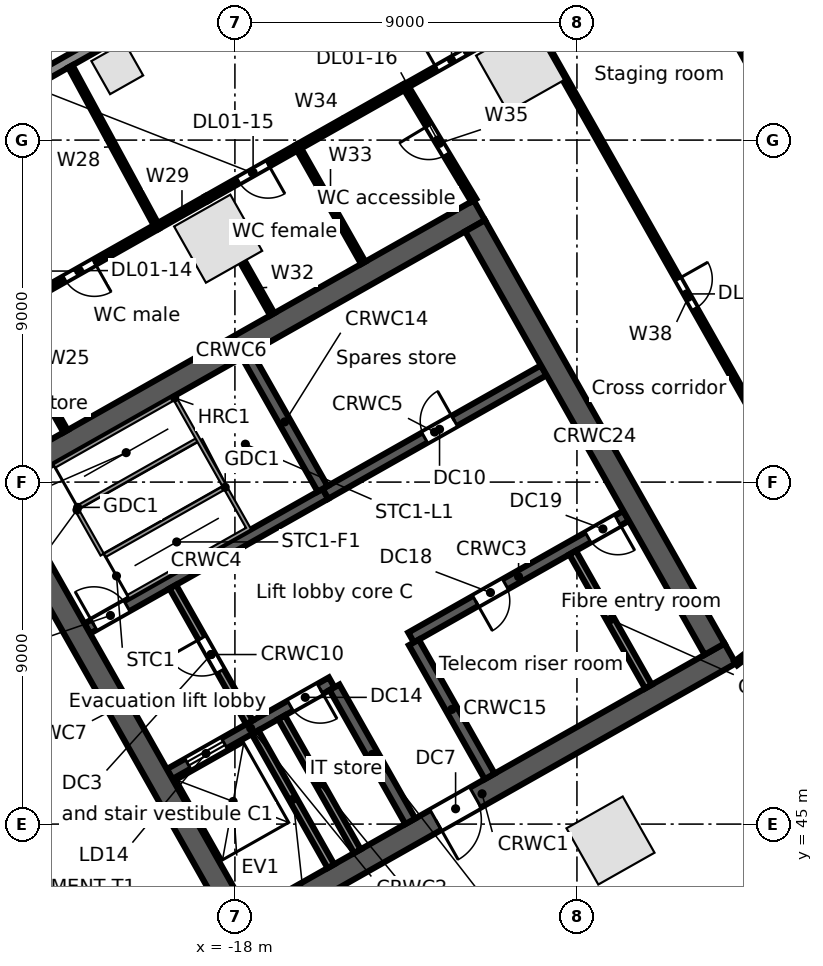
"""IFC4 building model, lengths in metres.
Left out: names, types, materials, properties, quantities, classifications, styles, units other than length and angle.
Written with IfcOpenShell. Run it as: python <this file> out.ifc"""

import sys

from ifc_helpers import new_model, si_unit, direction, frame, frame_2d, origin, origin_2d, place, context, subcontext, project, spatial, rectangle, extrude, element, fill, save


model = new_model("IFC4")
c1 = context("Model", 3, precision=1e-05, world=origin(), true_north=direction((0.0, 1.0)))
c2 = subcontext(c1, "Body", "Model", "MODEL_VIEW")
j1 = project(units=[si_unit("LENGTHUNIT", "METRE"), si_unit("PLANEANGLEUNIT", "RADIAN")], contexts=[c1])
p1 = place(None, origin())
s1 = spatial("IfcSite", under=j1, at=p1, CompositionType="ELEMENT")
p2 = place(p1, origin())
s2 = spatial("IfcBuilding", under=s1, at=p2, CompositionType="ELEMENT")
p3 = place(p2, frame((0.0, 0.0, 11.5)))
s3 = spatial("IfcBuildingStorey", under=s2, at=p3, CompositionType="ELEMENT", Elevation=11.5)
for number, where, z_axis, x_axis in (
    (1, (-10.495, 64.902, 0.0), (0.0, 0.0, 1.0), (-0.87, -0.492, 0.0)),
    (2, (-18.441, 60.406, 0.0), (0.0, 0.0, 1.0), (-0.87, -0.492, 0.0)),
    (3, (-8.117, 44.568, 0.0), (0.0, 0.0, 1.0), (0.87, 0.492, 0.0)),
):
    element("IfcColumn", number, at=place(p3, frame(where, z_axis=z_axis, x_axis=x_axis)), inside=s3, PredefinedType="COLUMN", context=c2, shape_type="SweptSolid", body=[
        extrude(rectangle(XDim=1.7, YDim=1.7, at=origin_2d()), origin(), (0.0, 0.0, 1.0), 5.0),
    ])
p4 = place(p3, frame((-21.096, 64.89, 0.0), z_axis=(0.0, 0.0, 1.0), x_axis=(-0.87035569594, -0.492423560103, 0.0)))
e4 = element("IfcColumn", 4, at=p4, inside=s3, PredefinedType="COLUMN", context=c2, shape_type="SweptSolid", body=[
    extrude(rectangle(XDim=1.0, YDim=1.0, at=origin_2d()), origin(), (0.0, 0.0, 1.0), 5.0),
])
p5 = place(p3, frame((-63.707, 41.701, 0.0), z_axis=(0.0, 0.0, 1.0), x_axis=(0.870355510268, 0.492423888277, 0.0)))
e5 = element("IfcWall", 5, at=p5, inside=s3, PredefinedType="STANDARD", context=c2, shape_type="SweptSolid", body=[
    extrude(rectangle(XDim=67.903, YDim=0.3, at=frame_2d((33.952, 0.0))), origin(), (0.0, 0.0, 1.0), 4.65),
])
p6 = place(p3, frame((-18.024, 42.104, 0.0), z_axis=(0.0, 0.0, 1.0), x_axis=(0.870360574057, 0.492414937962, 0.0)))
e6 = element("IfcWall", 6, at=p6, inside=s3, PredefinedType="SOLIDWALL", context=c2, shape_type="SweptSolid", body=[
    extrude(rectangle(XDim=15.0, YDim=0.6, at=frame_2d((7.5, 0.0))), origin(), (0.0, 0.0, 1.0), 4.65),
])
p7 = place(p6, frame((6.1, 0.0, 0.0)))
e7 = element("IfcOpeningElement", 7, at=p7, cuts=e6, PredefinedType="OPENING", context=c2, shape_type="SweptSolid", body=[
    extrude(rectangle(XDim=1.2, YDim=2.1, at=frame_2d((0.6, 1.05))), frame((0.0, 0.31, 0.0), z_axis=(0.0, -1.0, 0.0), x_axis=(1.0, 0.0, 0.0)), (0.0, 0.0, 1.0), 0.62),
])
p8 = place(p3, frame((-19.718, 46.316, 0.0), z_axis=(0.0, 0.0, 1.0), x_axis=(0.870353963862, 0.492426621528, 0.0)))
e8 = element("IfcWall", 8, at=p8, inside=s3, PredefinedType="SOLIDWALL", context=c2, shape_type="SweptSolid", body=[
    extrude(rectangle(XDim=4.9, YDim=0.3, at=frame_2d((2.45, 0.0))), origin(), (0.0, 0.0, 1.0), 4.65),
])
p9 = place(p8, frame((0.55, 0.0, 0.0)))
e9 = element("IfcOpeningElement", 9, at=p9, cuts=e8, PredefinedType="OPENING", context=c2, shape_type="SweptSolid", body=[
    extrude(rectangle(XDim=1.1, YDim=2.1, at=frame_2d((0.55, 1.05))), frame((0.0, 0.16, 0.0), z_axis=(0.0, -1.0, 0.0), x_axis=(1.0, 0.0, 0.0)), (0.0, 0.0, 1.0), 0.32),
])
p10 = place(p8, frame((3.65, 0.0, 0.0)))
e10 = element("IfcOpeningElement", 10, at=p10, cuts=e8, PredefinedType="OPENING", context=c2, shape_type="SweptSolid", body=[
    extrude(rectangle(XDim=0.9, YDim=2.1, at=frame_2d((0.45, 1.05))), frame((0.0, 0.16, 0.0), z_axis=(0.0, -1.0, 0.0), x_axis=(1.0, 0.0, 0.0)), (0.0, 0.0, 1.0), 0.32),
])
p11 = place(p3, frame((-13.365, 49.911, 0.0), z_axis=(0.0, 0.0, 1.0), x_axis=(0.870340995471, 0.49244954219, 0.0)))
e11 = element("IfcWall", 11, at=p11, inside=s3, PredefinedType="SOLIDWALL", context=c2, shape_type="SweptSolid", body=[
    extrude(rectangle(XDim=6.5, YDim=0.3, at=frame_2d((3.25, 0.0))), origin(), (0.0, 0.0, 1.0), 4.65),
])
p12 = place(p11, frame((1.95, 0.0, 0.0)))
e12 = element("IfcOpeningElement", 12, at=p12, cuts=e11, PredefinedType="OPENING", context=c2, shape_type="SweptSolid", body=[
    extrude(rectangle(XDim=0.9, YDim=2.1, at=frame_2d((0.45, 1.05))), frame((0.0, 0.16, 0.0), z_axis=(0.0, -1.0, 0.0), x_axis=(1.0, 0.0, 0.0)), (0.0, 0.0, 1.0), 0.32),
])
p13 = place(p11, frame((5.35, 0.0, 0.0)))
e13 = element("IfcOpeningElement", 13, at=p13, cuts=e11, PredefinedType="OPENING", context=c2, shape_type="SweptSolid", body=[
    extrude(rectangle(XDim=0.9, YDim=2.1, at=frame_2d((0.45, 1.05))), frame((0.0, 0.16, 0.0), z_axis=(0.0, -1.0, 0.0), x_axis=(1.0, 0.0, 0.0)), (0.0, 0.0, 1.0), 0.32),
])
p14 = place(p3, frame((-21.885, 50.146, 0.0), z_axis=(0.0, 0.0, 1.0), x_axis=(0.870359411463, 0.492416992881, 0.0)))
e14 = element("IfcWall", 14, at=p14, inside=s3, PredefinedType="SOLIDWALL", context=c2, shape_type="SweptSolid", body=[
    extrude(rectangle(XDim=7.2, YDim=0.3, at=frame_2d((3.6, 0.0))), origin(), (0.0, 0.0, 1.0), 4.65),
])
p15 = place(p14, frame((0.2, 0.0, 0.0)))
e15 = element("IfcOpeningElement", 15, at=p15, cuts=e14, PredefinedType="OPENING", context=c2, shape_type="SweptSolid", body=[
    extrude(rectangle(XDim=1.0, YDim=2.1, at=frame_2d((0.5, 1.05))), frame((0.0, 0.16, 0.0), z_axis=(0.0, -1.0, 0.0), x_axis=(1.0, 0.0, 0.0)), (0.0, 0.0, 1.0), 0.32),
])
p16 = place(p3, frame((-15.618, 53.691, 0.0), z_axis=(0.0, 0.0, 1.0), x_axis=(0.870356769198, 0.492421663121, 0.0)))
e16 = element("IfcWall", 16, at=p16, inside=s3, PredefinedType="SOLIDWALL", context=c2, shape_type="SweptSolid", body=[
    extrude(rectangle(XDim=6.6, YDim=0.3, at=frame_2d((3.3, 0.0))), origin(), (0.0, 0.0, 1.0), 4.65),
])
p17 = place(p16, frame((3.0, 0.0, 0.0)))
e17 = element("IfcOpeningElement", 17, at=p17, cuts=e16, PredefinedType="OPENING", context=c2, shape_type="SweptSolid", body=[
    extrude(rectangle(XDim=0.9, YDim=2.1, at=frame_2d((0.45, 1.05))), frame((0.0, 0.16, 0.0), z_axis=(0.0, -1.0, 0.0), x_axis=(1.0, 0.0, 0.0)), (0.0, 0.0, 1.0), 0.32),
])
p18 = place(p3, frame((-24.623, 53.767, 0.0), z_axis=(0.0, 0.0, 1.0), x_axis=(0.870356627484, 0.492421913601, 0.0)))
e18 = element("IfcWall", 18, at=p18, inside=s3, PredefinedType="SOLIDWALL", context=c2, shape_type="SweptSolid", body=[
    extrude(rectangle(XDim=15.0, YDim=0.6, at=frame_2d((7.5, 0.0))), origin(), (0.0, 0.0, 1.0), 4.65),
])
p19 = place(p3, frame((-24.214, 53.654, 0.0), z_axis=(0.0, 0.0, 1.0), x_axis=(0.492441221355, -0.870345703448, 0.0)))
e19 = element("IfcWall", 19, at=p19, inside=s3, PredefinedType="SOLIDWALL", context=c2, shape_type="SweptSolid", body=[
    extrude(rectangle(XDim=12.8, YDim=0.6, at=frame_2d((6.4, 0.0))), origin(), (0.0, 0.0, 1.0), 4.65),
])
p20 = place(p3, frame((-17.469, 47.417, 0.0), z_axis=(0.0, 0.0, 1.0), x_axis=(0.492440575896, -0.870346068648, 0.0)))
e20 = element("IfcWall", 20, at=p20, inside=s3, PredefinedType="SOLIDWALL", context=c2, shape_type="SweptSolid", body=[
    extrude(rectangle(XDim=4.05, YDim=0.2, at=frame_2d((2.025, 0.0))), origin(), (0.0, 0.0, 1.0), 4.65),
])
p21 = place(p3, frame((-19.635, 51.246, 0.0), z_axis=(0.0, 0.0, 1.0), x_axis=(0.492408451753, -0.87036424366, 0.0)))
e21 = element("IfcWall", 21, at=p21, inside=s3, PredefinedType="PARTITIONING", context=c2, shape_type="SweptSolid", body=[
    extrude(rectangle(XDim=4.1, YDim=0.2, at=frame_2d((2.05, 0.0))), origin(), (0.0, 0.0, 1.0), 4.65),
])
p22 = place(p21, frame((1.55, 0.0, 0.0)))
e22 = element("IfcOpeningElement", 22, at=p22, cuts=e21, PredefinedType="OPENING", context=c2, shape_type="SweptSolid", body=[
    extrude(rectangle(XDim=1.0, YDim=2.1, at=frame_2d((0.5, 1.05))), frame((0.0, 0.11, 0.0), z_axis=(0.0, -1.0, 0.0), x_axis=(1.0, 0.0, 0.0)), (0.0, 0.0, 1.0), 0.22),
])
p23 = place(p3, frame((-16.772, 47.811, 0.0), z_axis=(0.0, 0.0, 1.0), x_axis=(0.492440575896, -0.870346068648, 0.0)))
e23 = element("IfcWall", 23, at=p23, inside=s3, PredefinedType="SOLIDWALL", context=c2, shape_type="SweptSolid", body=[
    extrude(rectangle(XDim=4.05, YDim=0.2, at=frame_2d((2.025, 0.0))), origin(), (0.0, 0.0, 1.0), 4.65),
])
p24 = place(p3, frame((-15.379, 48.599, 0.0), z_axis=(0.0, 0.0, 1.0), x_axis=(0.492394910396, -0.870371904542, 0.0)))
e24 = element("IfcWall", 24, at=p24, inside=s3, PredefinedType="SOLIDWALL", context=c2, shape_type="SweptSolid", body=[
    extrude(rectangle(XDim=4.05, YDim=0.3, at=frame_2d((2.025, 0.0))), origin(), (0.0, 0.0, 1.0), 4.65),
])
p25 = place(p3, frame((-17.686, 57.347, 0.0), z_axis=(0.0, 0.0, 1.0), x_axis=(0.492420746998, -0.870357287513, 0.0)))
e25 = element("IfcWall", 25, at=p25, inside=s3, PredefinedType="SOLIDWALL", context=c2, shape_type="SweptSolid", body=[
    extrude(rectangle(XDim=4.05, YDim=0.3, at=frame_2d((2.025, 0.0))), origin(), (0.0, 0.0, 1.0), 4.65),
])
p26 = place(p3, frame((-13.291, 49.781, 0.0), z_axis=(0.0, 0.0, 1.0), x_axis=(0.492394910396, -0.870371904542, 0.0)))
e26 = element("IfcWall", 26, at=p26, inside=s3, PredefinedType="SOLIDWALL", context=c2, shape_type="SweptSolid", body=[
    extrude(rectangle(XDim=4.05, YDim=0.3, at=frame_2d((2.025, 0.0))), origin(), (0.0, 0.0, 1.0), 4.65),
])
p27 = place(p3, frame((-9.113, 52.144, 0.0), z_axis=(0.0, 0.0, 1.0), x_axis=(0.492394910396, -0.870371904542, 0.0)))
e27 = element("IfcWall", 27, at=p27, inside=s3, PredefinedType="PARTITIONING", context=c2, shape_type="SweptSolid", body=[
    extrude(rectangle(XDim=4.05, YDim=0.2, at=frame_2d((2.025, 0.0))), origin(), (0.0, 0.0, 1.0), 4.65),
])
p28 = place(p3, frame((-11.681, 60.744, 0.0), z_axis=(0.0, 0.0, 1.0), x_axis=(0.492426772896, -0.870353878221, 0.0)))
e28 = element("IfcWall", 28, at=p28, inside=s3, PredefinedType="SOLIDWALL", context=c2, shape_type="SweptSolid", body=[
    extrude(rectangle(XDim=12.8, YDim=0.6, at=frame_2d((6.4, 0.0))), origin(), (0.0, 0.0, 1.0), 4.65),
])
p29 = place(p3, frame((-24.18, 58.384, 0.0), z_axis=(0.0, 0.0, 1.0), x_axis=(0.492521469645, -0.870300294116, 0.0)))
e29 = element("IfcWall", 29, at=p29, inside=s3, PredefinedType="PARTITIONING", context=c2, shape_type="SweptSolid", body=[
    extrude(rectangle(XDim=3.5, YDim=0.125, at=frame_2d((1.75, 0.0))), origin(), (0.0, 0.0, 1.0), 3.93),
])
p30 = place(p3, frame((-24.18, 58.384, 0.0), z_axis=(0.0, 0.0, 1.0), x_axis=(0.870360772617, 0.492414587, 0.0)))
e30 = element("IfcWall", 30, at=p30, inside=s3, PredefinedType="PARTITIONING", context=c2, shape_type="SweptSolid", body=[
    extrude(rectangle(XDim=4.75, YDim=0.15, at=frame_2d((2.375, 0.0))), origin(), (0.0, 0.0, 1.0), 4.65),
])
p31 = place(p30, frame((1.95, 0.0, 0.0)))
e31 = element("IfcOpeningElement", 31, at=p31, cuts=e30, PredefinedType="OPENING", context=c2, shape_type="SweptSolid", body=[
    extrude(rectangle(XDim=0.9, YDim=2.1, at=frame_2d((0.45, 1.05))), frame((0.0, 0.085, 0.0), z_axis=(0.0, -1.0, 0.0), x_axis=(1.0, 0.0, 0.0)), (0.0, 0.0, 1.0), 0.17),
])
p32 = place(p3, frame((-22.33, 64.939, 0.0), z_axis=(0.0, 0.0, 1.0), x_axis=(0.476360236723, -0.879250206067, 0.0)))
e32 = element("IfcWall", 32, at=p32, inside=s3, PredefinedType="PARTITIONING", context=c2, shape_type="SweptSolid", body=[
    extrude(rectangle(XDim=4.795, YDim=0.125, at=frame_2d((2.397, 0.0))), origin(), (0.0, 0.0, 1.0), 3.93),
])
p33 = place(p3, frame((-20.046, 60.723, 0.0), z_axis=(0.0, 0.0, 1.0), x_axis=(0.870308175411, 0.492507542899, 0.0)))
e33 = element("IfcWall", 33, at=p33, inside=s3, PredefinedType="PARTITIONING", context=c2, shape_type="SweptSolid", body=[
    extrude(rectangle(XDim=1.5, YDim=0.15, at=frame_2d((0.75, 0.0))), origin(), (0.0, 0.0, 1.0), 3.93),
])
p34 = place(p3, frame((-18.74, 61.462, 0.0), z_axis=(0.0, 0.0, 1.0), x_axis=(0.870430549821, 0.492291232848, 0.0)))
e34 = element("IfcWall", 34, at=p34, inside=s3, PredefinedType="PARTITIONING", context=c2, shape_type="SweptSolid", body=[
    extrude(rectangle(XDim=2.75, YDim=0.15, at=frame_2d((1.375, 0.0))), origin(), (0.0, 0.0, 1.0), 4.65),
])
p35 = place(p34, frame((0.95, 0.0, 0.0)))
e35 = element("IfcOpeningElement", 35, at=p35, cuts=e34, PredefinedType="OPENING", context=c2, shape_type="SweptSolid", body=[
    extrude(rectangle(XDim=0.9, YDim=2.1, at=frame_2d((0.45, 1.05))), frame((0.0, 0.085, 0.0), z_axis=(0.0, -1.0, 0.0), x_axis=(1.0, 0.0, 0.0)), (0.0, 0.0, 1.0), 0.17),
])
p36 = place(p3, frame((-17.797, 59.794, 0.0), z_axis=(0.0, 0.0, 1.0), x_axis=(0.492366981934, -0.870387703901, 0.0)))
e36 = element("IfcWall", 36, at=p36, inside=s3, PredefinedType="PARTITIONING", context=c2, shape_type="SweptSolid", body=[
    extrude(rectangle(XDim=1.584, YDim=0.125, at=frame_2d((0.792, 0.0))), origin(), (0.0, 0.0, 1.0), 4.65),
])
p37 = place(p3, frame((-16.346, 62.816, 0.0), z_axis=(0.0, 0.0, 1.0), x_axis=(0.492220429283, -0.870470590541, 0.0)))
e37 = element("IfcWall", 37, at=p37, inside=s3, PredefinedType="PARTITIONING", context=c2, shape_type="SweptSolid", body=[
    extrude(rectangle(XDim=3.5, YDim=0.125, at=frame_2d((1.75, 0.0))), origin(), (0.0, 0.0, 1.0), 3.93),
])
p38 = place(p3, frame((-16.346, 62.816, 0.0), z_axis=(0.0, 0.0, 1.0), x_axis=(0.870334637055, 0.492460779699, 0.0)))
e38 = element("IfcWall", 38, at=p38, inside=s3, PredefinedType="PARTITIONING", context=c2, shape_type="SweptSolid", body=[
    extrude(rectangle(XDim=3.249, YDim=0.15, at=frame_2d((1.625, 0.0))), origin(), (0.0, 0.0, 1.0), 4.65),
])
p39 = place(p3, frame((-13.518, 64.416, 0.0), z_axis=(0.0, 0.0, 1.0), x_axis=(0.514875058642, -0.857265229663, 0.0)))
e39 = element("IfcWall", 39, at=p39, inside=s3, PredefinedType="PARTITIONING", context=c2, shape_type="SweptSolid", body=[
    extrude(rectangle(XDim=3.502, YDim=0.15, at=frame_2d((1.751, 0.0))), origin(), (0.0, 0.0, 1.0), 3.93),
])
p40 = place(p39, frame((1.2, 0.0, 0.0)))
e40 = element("IfcOpeningElement", 40, at=p40, cuts=e39, PredefinedType="OPENING", context=c2, shape_type="SweptSolid", body=[
    extrude(rectangle(XDim=0.9, YDim=2.1, at=frame_2d((0.45, 1.05))), frame((0.0, 0.085, 0.0), z_axis=(0.0, -1.0, 0.0), x_axis=(1.0, 0.0, 0.0)), (0.0, 0.0, 1.0), 0.17),
])
p41 = place(p3, frame((-13.518, 64.416, 0.0), z_axis=(0.0, 0.0, 1.0), x_axis=(0.870338454914, 0.492454032268, 0.0)))
e41 = element("IfcWall", 41, at=p41, inside=s3, PredefinedType="PARTITIONING", context=c2, shape_type="SweptSolid", body=[
    extrude(rectangle(XDim=3.75, YDim=0.125, at=frame_2d((1.875, 0.0))), origin(), (0.0, 0.0, 1.0), 3.712),
])
p42 = place(p41, frame((0.95, 0.0, 0.0)))
e42 = element("IfcOpeningElement", 42, at=p42, cuts=e41, PredefinedType="OPENING", context=c2, shape_type="SweptSolid", body=[
    extrude(rectangle(XDim=0.9, YDim=2.1, at=frame_2d((0.45, 1.05))), frame((0.0, 0.073, 0.0), z_axis=(0.0, -1.0, 0.0), x_axis=(1.0, 0.0, 0.0)), (0.0, 0.0, 1.0), 0.145),
])
p43 = place(p3, frame((-10.254, 66.263, 0.0), z_axis=(0.0, 0.0, 1.0), x_axis=(0.492411664329, -0.870362426138, 0.0)))
e43 = element("IfcWall", 43, at=p43, inside=s3, PredefinedType="PARTITIONING", context=c2, shape_type="SweptSolid", body=[
    extrude(rectangle(XDim=17.0, YDim=0.125, at=frame_2d((8.5, 0.0))), origin(), (0.0, 0.0, 1.0), 3.712),
])
p44 = place(p43, frame((7.95, 0.0, 0.0)))
e44 = element("IfcOpeningElement", 44, at=p44, cuts=e43, PredefinedType="OPENING", context=c2, shape_type="SweptSolid", body=[
    extrude(rectangle(XDim=0.9, YDim=2.1, at=frame_2d((0.45, 1.05))), frame((0.0, 0.073, 0.0), z_axis=(0.0, -1.0, 0.0), x_axis=(1.0, 0.0, 0.0)), (0.0, 0.0, 1.0), 0.145),
])
p45 = place(p3, frame((-6.337, 68.478, 0.0), z_axis=(0.0, 0.0, 1.0), x_axis=(0.483322867171, -0.875442177456, 0.0)))
e45 = element("IfcWall", 45, at=p45, inside=s3, PredefinedType="PARTITIONING", context=c2, shape_type="SweptSolid", body=[
    extrude(rectangle(XDim=9.594, YDim=0.2, at=frame_2d((4.797, 0.0))), origin(), (0.0, 0.0, 1.0), 3.712),
])
p46 = place(p3, frame((-4.821, 49.23, 0.0), z_axis=(0.0, 0.0, 1.0), x_axis=(0.795615322848, 0.605802160816, 0.0)))
e46 = element("IfcWall", 46, at=p46, inside=s3, PredefinedType="PARTITIONING", context=c2, shape_type="SweptSolid", body=[
    extrude(rectangle(XDim=3.693, YDim=0.125, at=frame_2d((1.846, 0.0))), origin(), (0.0, 0.0, 1.0), 4.65),
])
p47 = place(p46, frame((1.45, 0.0, 0.0)))
e47 = element("IfcOpeningElement", 47, at=p47, cuts=e46, PredefinedType="OPENING", context=c2, shape_type="SweptSolid", body=[
    extrude(rectangle(XDim=0.9, YDim=2.1, at=frame_2d((0.45, 1.05))), frame((0.0, 0.073, 0.0), z_axis=(0.0, -1.0, 0.0), x_axis=(1.0, 0.0, 0.0)), (0.0, 0.0, 1.0), 0.145),
])
p48 = place(p9, origin())
e48 = element("IfcDoor", 48, at=p48, inside=s3, OperationType="DOUBLE_DOOR_SLIDING", PredefinedType="DOOR", context=c2, shape_type="SweptSolid", body=[
    extrude(rectangle(XDim=1.1, YDim=2.1, at=frame_2d((0.55, 1.05))), frame((0.0, 0.025, 0.0), z_axis=(0.0, -1.0, 0.0), x_axis=(1.0, 0.0, 0.0)), (0.0, 0.0, 1.0), 0.05),
])
fill(e9, e48)
p49 = place(p15, origin())
e49 = element("IfcDoor", 49, at=p49, inside=s3, OperationType="SINGLE_SWING_LEFT", PredefinedType="DOOR", context=c2, shape_type="SweptSolid", body=[
    extrude(rectangle(XDim=1.0, YDim=2.1, at=frame_2d((0.5, 1.05))), frame((0.0, 0.025, 0.0), z_axis=(0.0, -1.0, 0.0), x_axis=(1.0, 0.0, 0.0)), (0.0, 0.0, 1.0), 0.05),
])
fill(e15, e49)
p50 = place(p22, frame((1.0, 0.0, 0.0), z_axis=(0.0, 0.0, 1.0), x_axis=(-1.0, 0.0, 0.0)))
e50 = element("IfcDoor", 50, at=p50, inside=s3, OperationType="SINGLE_SWING_RIGHT", PredefinedType="DOOR", context=c2, shape_type="SweptSolid", body=[
    extrude(rectangle(XDim=1.0, YDim=2.1, at=frame_2d((0.5, 1.05))), frame((0.0, 0.025, 0.0), z_axis=(0.0, -1.0, 0.0), x_axis=(1.0, 0.0, 0.0)), (0.0, 0.0, 1.0), 0.05),
])
fill(e22, e50)
p51 = place(p7, frame((1.2, 0.0, 0.0), z_axis=(0.0, 0.0, 1.0), x_axis=(-1.0, 0.0, 0.0)))
e51 = element("IfcDoor", 51, at=p51, inside=s3, OperationType="SINGLE_SWING_RIGHT", PredefinedType="DOOR", context=c2, shape_type="SweptSolid", body=[
    extrude(rectangle(XDim=1.2, YDim=2.1, at=frame_2d((0.6, 1.05))), frame((0.0, 0.025, 0.0), z_axis=(0.0, -1.0, 0.0), x_axis=(1.0, 0.0, 0.0)), (0.0, 0.0, 1.0), 0.05),
])
fill(e7, e51)
p52 = place(p17, origin())
e52 = element("IfcDoor", 52, at=p52, inside=s3, OperationType="SINGLE_SWING_RIGHT", PredefinedType="DOOR", context=c2, shape_type="SweptSolid", body=[
    extrude(rectangle(XDim=0.9, YDim=2.1, at=frame_2d((0.45, 1.05))), frame((0.0, 0.025, 0.0), z_axis=(0.0, -1.0, 0.0), x_axis=(1.0, 0.0, 0.0)), (0.0, 0.0, 1.0), 0.05),
])
fill(e17, e52)
p53 = place(p10, frame((0.9, 0.0, 0.0), z_axis=(0.0, 0.0, 1.0), x_axis=(-1.0, 0.0, 0.0)))
e53 = element("IfcDoor", 53, at=p53, inside=s3, OperationType="SINGLE_SWING_LEFT", PredefinedType="DOOR", context=c2, shape_type="SweptSolid", body=[
    extrude(rectangle(XDim=0.9, YDim=2.1, at=frame_2d((0.45, 1.05))), frame((0.0, 0.025, 0.0), z_axis=(0.0, -1.0, 0.0), x_axis=(1.0, 0.0, 0.0)), (0.0, 0.0, 1.0), 0.05),
])
fill(e10, e53)
p54 = place(p12, frame((0.9, 0.0, 0.0), z_axis=(0.0, 0.0, 1.0), x_axis=(-1.0, 0.0, 0.0)))
e54 = element("IfcDoor", 54, at=p54, inside=s3, OperationType="SINGLE_SWING_RIGHT", PredefinedType="DOOR", context=c2, shape_type="SweptSolid", body=[
    extrude(rectangle(XDim=0.9, YDim=2.1, at=frame_2d((0.45, 1.05))), frame((0.0, 0.025, 0.0), z_axis=(0.0, -1.0, 0.0), x_axis=(1.0, 0.0, 0.0)), (0.0, 0.0, 1.0), 0.05),
])
fill(e12, e54)
p55 = place(p13, frame((0.9, 0.0, 0.0), z_axis=(0.0, 0.0, 1.0), x_axis=(-1.0, 0.0, 0.0)))
e55 = element("IfcDoor", 55, at=p55, inside=s3, OperationType="SINGLE_SWING_LEFT", PredefinedType="DOOR", context=c2, shape_type="SweptSolid", body=[
    extrude(rectangle(XDim=0.9, YDim=2.1, at=frame_2d((0.45, 1.05))), frame((0.0, 0.025, 0.0), z_axis=(0.0, -1.0, 0.0), x_axis=(1.0, 0.0, 0.0)), (0.0, 0.0, 1.0), 0.05),
])
fill(e13, e55)
p56 = place(p42, origin())
e56 = element("IfcDoor", 56, at=p56, inside=s3, OperationType="SINGLE_SWING_LEFT", PredefinedType="DOOR", context=c2, shape_type="SweptSolid", body=[
    extrude(rectangle(XDim=0.9, YDim=2.1, at=frame_2d((0.45, 1.05))), frame((0.0, 0.025, 0.0), z_axis=(0.0, -1.0, 0.0), x_axis=(1.0, 0.0, 0.0)), (0.0, 0.0, 1.0), 0.05),
])
fill(e42, e56)
p57 = place(p44, origin())
e57 = element("IfcDoor", 57, at=p57, inside=s3, OperationType="SINGLE_SWING_LEFT", PredefinedType="DOOR", context=c2, shape_type="SweptSolid", body=[
    extrude(rectangle(XDim=0.9, YDim=2.1, at=frame_2d((0.45, 1.05))), frame((0.0, 0.025, 0.0), z_axis=(0.0, -1.0, 0.0), x_axis=(1.0, 0.0, 0.0)), (0.0, 0.0, 1.0), 0.05),
])
fill(e44, e57)
p58 = place(p31, frame((0.9, 0.0, 0.0), z_axis=(0.0, 0.0, 1.0), x_axis=(-1.0, 0.0, 0.0)))
e58 = element("IfcDoor", 58, at=p58, inside=s3, OperationType="SINGLE_SWING_LEFT", PredefinedType="DOOR", context=c2, shape_type="SweptSolid", body=[
    extrude(rectangle(XDim=0.9, YDim=2.1, at=frame_2d((0.45, 1.05))), frame((0.0, 0.025, 0.0), z_axis=(0.0, -1.0, 0.0), x_axis=(1.0, 0.0, 0.0)), (0.0, 0.0, 1.0), 0.05),
])
fill(e31, e58)
p59 = place(p35, frame((0.9, 0.0, 0.0), z_axis=(0.0, 0.0, 1.0), x_axis=(-1.0, 0.0, 0.0)))
e59 = element("IfcDoor", 59, at=p59, inside=s3, OperationType="SINGLE_SWING_LEFT", PredefinedType="DOOR", context=c2, shape_type="SweptSolid", body=[
    extrude(rectangle(XDim=0.9, YDim=2.1, at=frame_2d((0.45, 1.05))), frame((0.0, 0.025, 0.0), z_axis=(0.0, -1.0, 0.0), x_axis=(1.0, 0.0, 0.0)), (0.0, 0.0, 1.0), 0.05),
])
fill(e35, e59)
p60 = place(p40, frame((0.9, 0.0, 0.0), z_axis=(0.0, 0.0, 1.0), x_axis=(-1.0, 0.0, 0.0)))
e60 = element("IfcDoor", 60, at=p60, inside=s3, OperationType="SINGLE_SWING_RIGHT", PredefinedType="DOOR", context=c2, shape_type="SweptSolid", body=[
    extrude(rectangle(XDim=0.9, YDim=2.1, at=frame_2d((0.45, 1.05))), frame((0.0, 0.025, 0.0), z_axis=(0.0, -1.0, 0.0), x_axis=(1.0, 0.0, 0.0)), (0.0, 0.0, 1.0), 0.05),
])
fill(e40, e60)
save(model, sys.argv[1])
